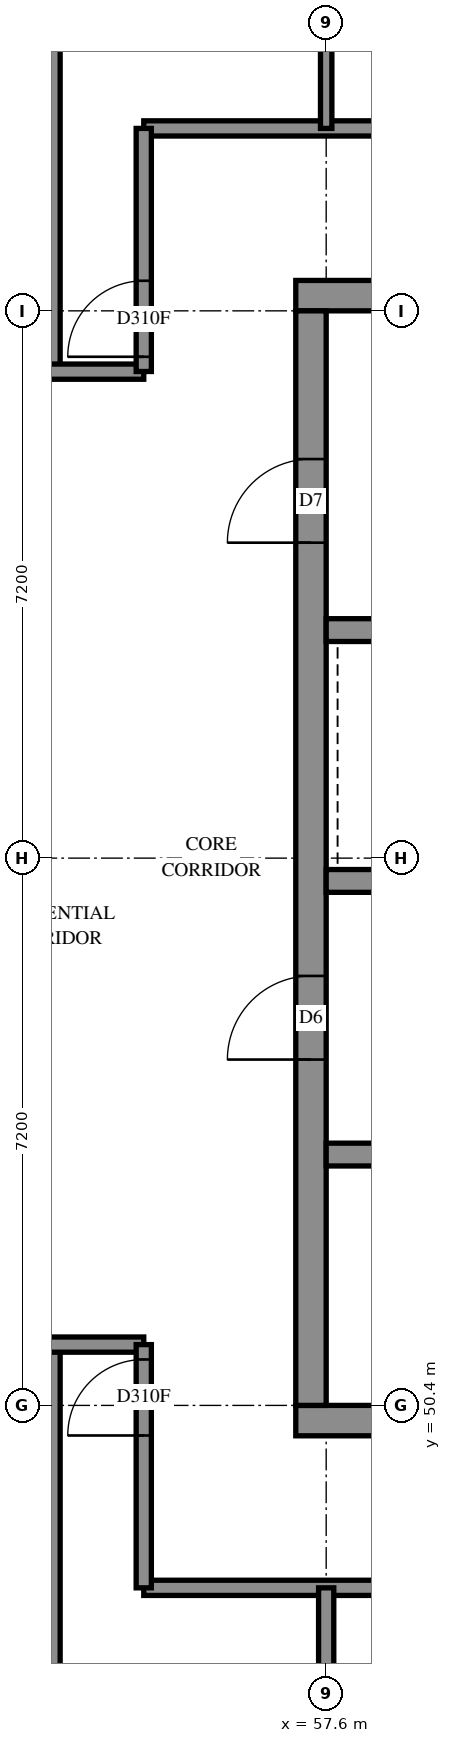
"""IFC4 building model, lengths in metres.
Left out: names, types, materials, properties, quantities, classifications, styles, units other than length and angle.
Written with IfcOpenShell. Run it as: python <this file> out.ifc"""

import sys

from ifc_helpers import new_model, si_unit, direction, frame, frame_2d, origin, place, context, subcontext, project, spatial, rectangle, extrude, element, fill, save


model = new_model("IFC4")
c1 = context("Model", 3, precision=1e-05, world=origin(), true_north=direction((0.0, 1.0)))
c2 = subcontext(c1, "Body", "Model", "MODEL_VIEW")
j1 = project(units=[si_unit("LENGTHUNIT", "METRE"), si_unit("PLANEANGLEUNIT", "RADIAN")], contexts=[c1])
p1 = place(None, origin())
s1 = spatial("IfcSite", under=j1, at=p1, CompositionType="ELEMENT")
p2 = place(p1, origin())
s2 = spatial("IfcBuilding", under=s1, at=p2, CompositionType="ELEMENT")
p3 = place(p2, frame((0.0, 0.0, 277.8)))
s3 = spatial("IfcBuildingStorey", under=s2, at=p3, CompositionType="ELEMENT", Elevation=277.8)
p4 = place(p3, frame((57.2, 50.2, -0.3), z_axis=(0.0, 0.0, 1.0), x_axis=(1.0, 0.0, 0.0)))
e1 = element("IfcWall", 1, at=p4, inside=s3, PredefinedType="SHEAR", context=c2, shape_type="SweptSolid", body=[
    extrude(rectangle(XDim=15.2, YDim=0.4, at=frame_2d((7.6, 0.0))), origin(), (0.0, 0.0, 1.0), 2.7),
])
p5 = place(p3, frame((57.2, 65.0, -0.3), z_axis=(0.0, 0.0, 1.0), x_axis=(1.0, 0.0, 0.0)))
e2 = element("IfcWall", 2, at=p5, inside=s3, PredefinedType="SHEAR", context=c2, shape_type="SweptSolid", body=[
    extrude(rectangle(XDim=15.2, YDim=0.4, at=frame_2d((7.6, 0.0))), origin(), (0.0, 0.0, 1.0), 2.7),
])
p6 = place(p5, frame((10.4, 0.0, 0.3)))
e3 = element("IfcOpeningElement", 3, at=p6, cuts=e2, PredefinedType="OPENING", context=c2, shape_type="SweptSolid", body=[
    extrude(rectangle(XDim=0.8, YDim=2.1, at=frame_2d((0.4, 1.05))), frame((0.0, 0.21, 0.0), z_axis=(0.0, -1.0, 0.0), x_axis=(1.0, 0.0, 0.0)), (0.0, 0.0, 1.0), 0.42),
])
p7 = place(p3, frame((57.4, 50.4, -0.3), z_axis=(0.0, 0.0, 1.0), x_axis=(0.0, 1.0, 0.0)))
e4 = element("IfcWall", 4, at=p7, inside=s3, PredefinedType="SHEAR", context=c2, shape_type="SweptSolid", body=[
    extrude(rectangle(XDim=14.4, YDim=0.4, at=frame_2d((7.2, 0.0))), origin(), (0.0, 0.0, 1.0), 2.7),
])
p8 = place(p7, frame((4.55, 0.0, 0.3)))
e5 = element("IfcOpeningElement", 5, at=p8, cuts=e4, PredefinedType="OPENING", context=c2, shape_type="SweptSolid", body=[
    extrude(rectangle(XDim=1.1, YDim=2.1, at=frame_2d((0.55, 1.05))), frame((0.0, 0.21, 0.0), z_axis=(0.0, -1.0, 0.0), x_axis=(1.0, 0.0, 0.0)), (0.0, 0.0, 1.0), 0.42),
])
p9 = place(p7, frame((11.35, 0.0, 0.3)))
e6 = element("IfcOpeningElement", 6, at=p9, cuts=e4, PredefinedType="OPENING", context=c2, shape_type="SweptSolid", body=[
    extrude(rectangle(XDim=1.1, YDim=2.1, at=frame_2d((0.55, 1.05))), frame((0.0, 0.21, 0.0), z_axis=(0.0, -1.0, 0.0), x_axis=(1.0, 0.0, 0.0)), (0.0, 0.0, 1.0), 0.42),
])
p10 = place(p3, frame((57.6, 53.7, 0.0), z_axis=(0.0, 0.0, 1.0), x_axis=(1.0, 0.0, 0.0)))
e7 = element("IfcWall", 7, at=p10, inside=s3, PredefinedType="SOLIDWALL", context=c2, shape_type="SweptSolid", body=[
    extrude(rectangle(XDim=14.4, YDim=0.3, at=frame_2d((7.2, 0.0))), origin(), (0.0, 0.0, 1.0), 3.1),
])
p11 = place(p10, frame((1.35, 0.0, 0.0)))
e8 = element("IfcOpeningElement", 8, at=p11, cuts=e7, PredefinedType="OPENING", context=c2, shape_type="SweptSolid", body=[
    extrude(rectangle(XDim=0.9, YDim=2.1, at=frame_2d((0.45, 1.05))), frame((0.0, 0.16, 0.0), z_axis=(0.0, -1.0, 0.0), x_axis=(1.0, 0.0, 0.0)), (0.0, 0.0, 1.0), 0.32),
])
p12 = place(p10, frame((4.95, 0.0, 0.0)))
e9 = element("IfcOpeningElement", 9, at=p12, cuts=e7, PredefinedType="OPENING", context=c2, shape_type="SweptSolid", body=[
    extrude(rectangle(XDim=0.9, YDim=2.1, at=frame_2d((0.45, 1.05))), frame((0.0, 0.16, 0.0), z_axis=(0.0, -1.0, 0.0), x_axis=(1.0, 0.0, 0.0)), (0.0, 0.0, 1.0), 0.32),
])
p13 = place(p10, frame((8.55, 0.0, 0.0)))
e10 = element("IfcOpeningElement", 10, at=p13, cuts=e7, PredefinedType="OPENING", context=c2, shape_type="SweptSolid", body=[
    extrude(rectangle(XDim=0.9, YDim=2.1, at=frame_2d((0.45, 1.05))), frame((0.0, 0.16, 0.0), z_axis=(0.0, -1.0, 0.0), x_axis=(1.0, 0.0, 0.0)), (0.0, 0.0, 1.0), 0.32),
])
p14 = place(p10, frame((12.05, 0.0, 0.0)))
e11 = element("IfcOpeningElement", 11, at=p14, cuts=e7, PredefinedType="OPENING", context=c2, shape_type="SweptSolid", body=[
    extrude(rectangle(XDim=1.1, YDim=2.1, at=frame_2d((0.55, 1.05))), frame((0.0, 0.16, 0.0), z_axis=(0.0, -1.0, 0.0), x_axis=(1.0, 0.0, 0.0)), (0.0, 0.0, 1.0), 0.32),
])
p15 = place(p3, frame((57.6, 57.3, 0.0), z_axis=(0.0, 0.0, 1.0), x_axis=(1.0, 0.0, 0.0)))
e12 = element("IfcWall", 12, at=p15, inside=s3, PredefinedType="SOLIDWALL", context=c2, shape_type="SweptSolid", body=[
    extrude(rectangle(XDim=14.4, YDim=0.3, at=frame_2d((7.2, 0.0))), origin(), (0.0, 0.0, 1.0), 3.1),
])
p16 = place(p15, frame((8.55, 0.0, 0.0)))
e13 = element("IfcOpeningElement", 13, at=p16, cuts=e12, PredefinedType="OPENING", context=c2, shape_type="SweptSolid", body=[
    extrude(rectangle(XDim=0.9, YDim=2.1, at=frame_2d((0.45, 1.05))), frame((0.0, 0.16, 0.0), z_axis=(0.0, -1.0, 0.0), x_axis=(1.0, 0.0, 0.0)), (0.0, 0.0, 1.0), 0.32),
])
p17 = place(p15, frame((1.25, 0.0, 0.0)))
e14 = element("IfcOpeningElement", 14, at=p17, cuts=e12, PredefinedType="OPENING", context=c2, shape_type="SweptSolid", body=[
    extrude(rectangle(XDim=1.1, YDim=2.1, at=frame_2d((0.55, 1.05))), frame((0.0, 0.16, 0.0), z_axis=(0.0, -1.0, 0.0), x_axis=(1.0, 0.0, 0.0)), (0.0, 0.0, 1.0), 0.32),
])
p18 = place(p15, frame((4.85, 0.0, 0.0)))
e15 = element("IfcOpeningElement", 15, at=p18, cuts=e12, PredefinedType="OPENING", context=c2, shape_type="SweptSolid", body=[
    extrude(rectangle(XDim=1.1, YDim=2.1, at=frame_2d((0.55, 1.05))), frame((0.0, 0.16, 0.0), z_axis=(0.0, -1.0, 0.0), x_axis=(1.0, 0.0, 0.0)), (0.0, 0.0, 1.0), 0.32),
])
p19 = place(p15, frame((12.05, 0.0, 0.0)))
e16 = element("IfcOpeningElement", 16, at=p19, cuts=e12, PredefinedType="OPENING", context=c2, shape_type="SweptSolid", body=[
    extrude(rectangle(XDim=1.1, YDim=2.1, at=frame_2d((0.55, 1.05))), frame((0.0, 0.16, 0.0), z_axis=(0.0, -1.0, 0.0), x_axis=(1.0, 0.0, 0.0)), (0.0, 0.0, 1.0), 0.32),
])
p20 = place(p3, frame((57.6, 60.6, 0.0), z_axis=(0.0, 0.0, 1.0), x_axis=(1.0, 0.0, 0.0)))
e17 = element("IfcWall", 17, at=p20, inside=s3, PredefinedType="SOLIDWALL", context=c2, shape_type="SweptSolid", body=[
    extrude(rectangle(XDim=7.2, YDim=0.3, at=frame_2d((3.6, 0.0))), origin(), (0.0, 0.0, 1.0), 3.1),
])
p21 = place(p3, frame((55.2, 67.2, 0.0), z_axis=(0.0, 0.0, 1.0), x_axis=(1.0, 0.0, 0.0)))
e18 = element("IfcWall", 18, at=p21, inside=s3, PredefinedType="PARTITIONING", context=c2, shape_type="SweptSolid", body=[
    extrude(rectangle(XDim=19.2, YDim=0.2, at=frame_2d((9.6, 0.0))), origin(), (0.0, 0.0, 1.0), 3.1),
])
p22 = place(p21, frame((6.261, 0.0, 0.0)))
e19 = element("IfcOpeningElement", 19, at=p22, cuts=e18, PredefinedType="OPENING", context=c2, shape_type="SweptSolid", body=[
    extrude(rectangle(XDim=0.9, YDim=2.1, at=frame_2d((0.45, 1.05))), frame((0.0, 0.11, 0.0), z_axis=(0.0, -1.0, 0.0), x_axis=(1.0, 0.0, 0.0)), (0.0, 0.0, 1.0), 0.22),
])
p23 = place(p21, frame((11.675, 0.0, 0.0)))
e20 = element("IfcOpeningElement", 20, at=p23, cuts=e18, PredefinedType="OPENING", context=c2, shape_type="SweptSolid", body=[
    extrude(rectangle(XDim=1.0, YDim=2.1, at=frame_2d((0.5, 1.05))), frame((0.0, 0.11, 0.0), z_axis=(0.0, -1.0, 0.0), x_axis=(1.0, 0.0, 0.0)), (0.0, 0.0, 1.0), 0.22),
])
p24 = place(p21, frame((13.88, 0.0, 0.0)))
e21 = element("IfcOpeningElement", 21, at=p24, cuts=e18, PredefinedType="OPENING", context=c2, shape_type="SweptSolid", body=[
    extrude(rectangle(XDim=1.0, YDim=2.1, at=frame_2d((0.5, 1.05))), frame((0.0, 0.11, 0.0), z_axis=(0.0, -1.0, 0.0), x_axis=(1.0, 0.0, 0.0)), (0.0, 0.0, 1.0), 0.22),
])
p25 = place(p3, frame((55.2, 48.0, 0.0), z_axis=(0.0, 0.0, 1.0), x_axis=(1.0, 0.0, 0.0)))
e22 = element("IfcWall", 22, at=p25, inside=s3, PredefinedType="PARTITIONING", context=c2, shape_type="SweptSolid", body=[
    extrude(rectangle(XDim=19.15, YDim=0.2, at=frame_2d((9.575, 0.0))), origin(), (0.0, 0.0, 1.0), 3.1),
])
p26 = place(p25, frame((4.475, 0.0, 0.0)))
e23 = element("IfcOpeningElement", 23, at=p26, cuts=e22, PredefinedType="OPENING", context=c2, shape_type="SweptSolid", body=[
    extrude(rectangle(XDim=1.0, YDim=2.1, at=frame_2d((0.5, 1.05))), frame((0.0, 0.11, 0.0), z_axis=(0.0, -1.0, 0.0), x_axis=(1.0, 0.0, 0.0)), (0.0, 0.0, 1.0), 0.22),
])
p27 = place(p25, frame((6.525, 0.0, 0.0)))
e24 = element("IfcOpeningElement", 24, at=p27, cuts=e22, PredefinedType="OPENING", context=c2, shape_type="SweptSolid", body=[
    extrude(rectangle(XDim=1.0, YDim=2.1, at=frame_2d((0.5, 1.05))), frame((0.0, 0.11, 0.0), z_axis=(0.0, -1.0, 0.0), x_axis=(1.0, 0.0, 0.0)), (0.0, 0.0, 1.0), 0.22),
])
p28 = place(p25, frame((13.463, 0.0, 0.0)))
e25 = element("IfcOpeningElement", 25, at=p28, cuts=e22, PredefinedType="OPENING", context=c2, shape_type="SweptSolid", body=[
    extrude(rectangle(XDim=1.0, YDim=2.1, at=frame_2d((0.5, 1.05))), frame((0.0, 0.11, 0.0), z_axis=(0.0, -1.0, 0.0), x_axis=(1.0, 0.0, 0.0)), (0.0, 0.0, 1.0), 0.22),
])
p29 = place(p3, frame((54.0, 64.0, 0.0), z_axis=(0.0, 0.0, 1.0), x_axis=(0.0, 1.0, 0.0)))
e26 = element("IfcWall", 26, at=p29, inside=s3, PredefinedType="PARTITIONING", context=c2, shape_type="SweptSolid", body=[
    extrude(rectangle(XDim=8.855, YDim=0.2, at=frame_2d((4.428, 0.0))), origin(), (0.0, 0.0, 1.0), 3.1),
])
p30 = place(p3, frame((54.0, 42.45, 0.0), z_axis=(0.0, 0.0, 1.0), x_axis=(0.0, 1.0, 0.0)))
e27 = element("IfcWall", 27, at=p30, inside=s3, PredefinedType="PARTITIONING", context=c2, shape_type="SweptSolid", body=[
    extrude(rectangle(XDim=8.75, YDim=0.2, at=frame_2d((4.375, 0.0))), origin(), (0.0, 0.0, 1.0), 3.1),
])
p31 = place(p3, frame((50.4, 51.2, 0.0), z_axis=(0.0, 0.0, 1.0), x_axis=(1.0, 0.0, 0.0)))
e28 = element("IfcWall", 28, at=p31, inside=s3, PredefinedType="PARTITIONING", context=c2, shape_type="SweptSolid", body=[
    extrude(rectangle(XDim=4.8, YDim=0.2, at=frame_2d((2.4, 0.0))), origin(), (0.0, 0.0, 1.0), 3.1),
])
p32 = place(p31, frame((2.075, 0.0, 0.0)))
e29 = element("IfcOpeningElement", 29, at=p32, cuts=e28, PredefinedType="OPENING", context=c2, shape_type="SweptSolid", body=[
    extrude(rectangle(XDim=1.0, YDim=2.1, at=frame_2d((0.5, 1.05))), frame((0.0, 0.11, 0.0), z_axis=(0.0, -1.0, 0.0), x_axis=(1.0, 0.0, 0.0)), (0.0, 0.0, 1.0), 0.22),
])
p33 = place(p3, frame((50.4, 64.0, 0.0), z_axis=(0.0, 0.0, 1.0), x_axis=(1.0, 0.0, 0.0)))
e30 = element("IfcWall", 30, at=p33, inside=s3, PredefinedType="PARTITIONING", context=c2, shape_type="SweptSolid", body=[
    extrude(rectangle(XDim=4.8, YDim=0.2, at=frame_2d((2.4, 0.0))), origin(), (0.0, 0.0, 1.0), 3.1),
])
p34 = place(p33, frame((2.075, 0.0, 0.0)))
e31 = element("IfcOpeningElement", 31, at=p34, cuts=e30, PredefinedType="OPENING", context=c2, shape_type="SweptSolid", body=[
    extrude(rectangle(XDim=1.0, YDim=2.1, at=frame_2d((0.5, 1.05))), frame((0.0, 0.11, 0.0), z_axis=(0.0, -1.0, 0.0), x_axis=(1.0, 0.0, 0.0)), (0.0, 0.0, 1.0), 0.22),
])
p35 = place(p3, frame((57.6, 43.55, 0.0), z_axis=(0.0, 0.0, 1.0), x_axis=(0.0, 1.0, 0.0)))
e32 = element("IfcWall", 32, at=p35, inside=s3, PredefinedType="PARTITIONING", context=c2, shape_type="SweptSolid", body=[
    extrude(rectangle(XDim=4.45, YDim=0.2, at=frame_2d((2.225, 0.0))), origin(), (0.0, 0.0, 1.0), 3.1),
])
p36 = place(p3, frame((55.2, 48.0, 0.0), z_axis=(0.0, 0.0, 1.0), x_axis=(0.0, 1.0, 0.0)))
e33 = element("IfcWall", 33, at=p36, inside=s3, PredefinedType="PARTITIONING", context=c2, shape_type="SweptSolid", body=[
    extrude(rectangle(XDim=3.2, YDim=0.2, at=frame_2d((1.6, 0.0))), origin(), (0.0, 0.0, 1.0), 3.1),
])
p37 = place(p36, frame((2.004, 0.0, 0.0)))
e34 = element("IfcOpeningElement", 34, at=p37, cuts=e33, PredefinedType="OPENING", context=c2, shape_type="SweptSolid", body=[
    extrude(rectangle(XDim=1.0, YDim=2.1, at=frame_2d((0.5, 1.05))), frame((0.0, 0.11, 0.0), z_axis=(0.0, -1.0, 0.0), x_axis=(1.0, 0.0, 0.0)), (0.0, 0.0, 1.0), 0.22),
])
p38 = place(p3, frame((55.2, 64.002, 0.0), z_axis=(0.0, 0.0, 1.0), x_axis=(0.0, 1.0, 0.0)))
e35 = element("IfcWall", 35, at=p38, inside=s3, PredefinedType="PARTITIONING", context=c2, shape_type="SweptSolid", body=[
    extrude(rectangle(XDim=3.198, YDim=0.2, at=frame_2d((1.599, 0.0))), origin(), (0.0, 0.0, 1.0), 3.1),
])
p39 = place(p38, frame((0.194, 0.0, 0.0)))
e36 = element("IfcOpeningElement", 36, at=p39, cuts=e35, PredefinedType="OPENING", context=c2, shape_type="SweptSolid", body=[
    extrude(rectangle(XDim=1.0, YDim=2.1, at=frame_2d((0.5, 1.05))), frame((0.0, 0.11, 0.0), z_axis=(0.0, -1.0, 0.0), x_axis=(1.0, 0.0, 0.0)), (0.0, 0.0, 1.0), 0.22),
])
p40 = place(p3, frame((57.6, 67.2, 0.0), z_axis=(0.0, 0.0, 1.0), x_axis=(0.0, 1.0, 0.0)))
e37 = element("IfcWall", 37, at=p40, inside=s3, PredefinedType="PARTITIONING", context=c2, shape_type="SweptSolid", body=[
    extrude(rectangle(XDim=2.4, YDim=0.15, at=frame_2d((1.2, 0.0))), origin(), (0.0, 0.0, 1.0), 3.1),
])
p41 = place(p8, origin())
e38 = element("IfcDoor", 38, at=p41, inside=s3, OperationType="DOUBLE_DOOR_SINGLE_SWING", PredefinedType="DOOR", context=c2, shape_type="SweptSolid", body=[
    extrude(rectangle(XDim=1.1, YDim=2.1, at=frame_2d((0.55, 1.05))), frame((0.0, 0.025, 0.0), z_axis=(0.0, -1.0, 0.0), x_axis=(1.0, 0.0, 0.0)), (0.0, 0.0, 1.0), 0.05),
])
fill(e5, e38)
p42 = place(p9, origin())
e39 = element("IfcDoor", 39, at=p42, inside=s3, OperationType="SINGLE_SWING_LEFT", PredefinedType="DOOR", context=c2, shape_type="SweptSolid", body=[
    extrude(rectangle(XDim=1.1, YDim=2.1, at=frame_2d((0.55, 1.05))), frame((0.0, 0.025, 0.0), z_axis=(0.0, -1.0, 0.0), x_axis=(1.0, 0.0, 0.0)), (0.0, 0.0, 1.0), 0.05),
])
fill(e6, e39)
p43 = place(p39, origin())
e40 = element("IfcDoor", 40, at=p43, inside=s3, OperationType="SINGLE_SWING_LEFT", PredefinedType="DOOR", context=c2, shape_type="SweptSolid", body=[
    extrude(rectangle(XDim=1.0, YDim=2.1, at=frame_2d((0.5, 1.05))), frame((0.0, 0.025, 0.0), z_axis=(0.0, -1.0, 0.0), x_axis=(1.0, 0.0, 0.0)), (0.0, 0.0, 1.0), 0.05),
])
fill(e36, e40)
p44 = place(p37, origin())
e41 = element("IfcDoor", 41, at=p44, inside=s3, OperationType="SINGLE_SWING_RIGHT", PredefinedType="DOOR", context=c2, shape_type="SweptSolid", body=[
    extrude(rectangle(XDim=1.0, YDim=2.1, at=frame_2d((0.5, 1.05))), frame((0.0, 0.025, 0.0), z_axis=(0.0, -1.0, 0.0), x_axis=(1.0, 0.0, 0.0)), (0.0, 0.0, 1.0), 0.05),
])
fill(e34, e41)
save(model, sys.argv[1])
